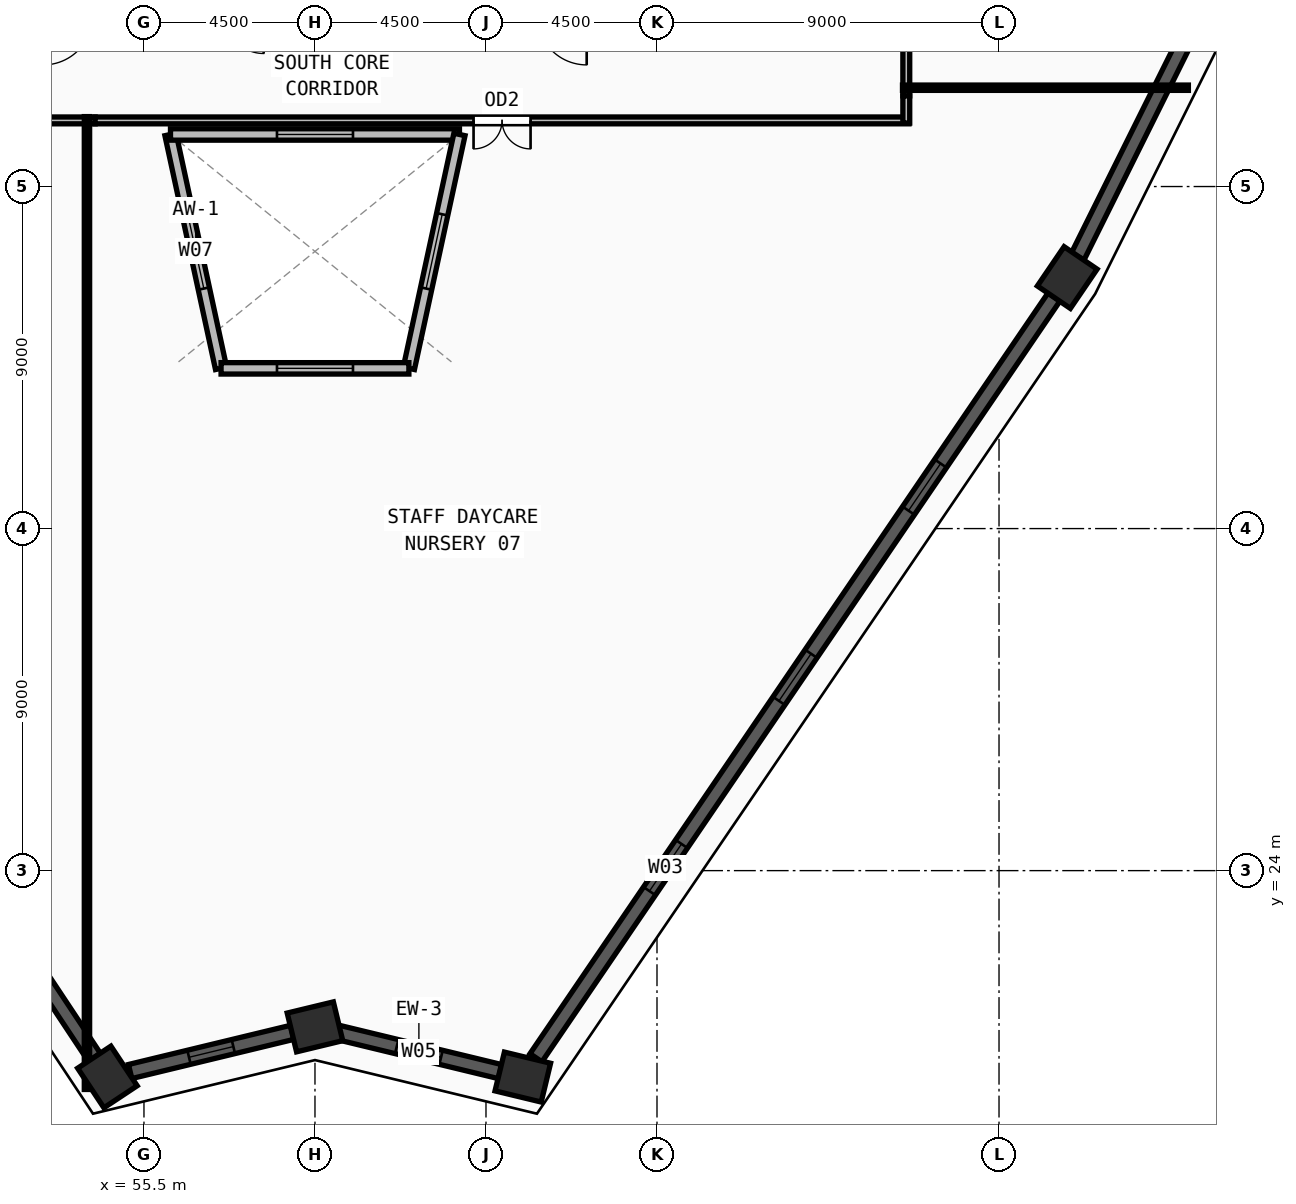
"""IFC4 building model, lengths in metres.
Left out: names, types, materials, properties, quantities, classifications, styles, units other than length and angle.
Written with IfcOpenShell. Run it as: python <this file> out.ifc"""

import sys

from ifc_helpers import new_model, si_unit, direction, frame, frame_2d, origin, origin_2d, place, context, subcontext, project, spatial, rectangle, extrude, source, transform, mapped, element, fill, save


model = new_model("IFC4")
c1 = context("Model", 3, precision=1e-05, world=origin(), true_north=direction((0.0, 1.0)))
c2 = subcontext(c1, "Body", "Model", "MODEL_VIEW")
j1 = project(units=[si_unit("LENGTHUNIT", "METRE"), si_unit("PLANEANGLEUNIT", "RADIAN")], contexts=[c1])
p1 = place(None, origin())
s1 = spatial("IfcSite", under=j1, at=p1, CompositionType="ELEMENT")
p2 = place(p1, origin())
s2 = spatial("IfcBuilding", under=s1, at=p2, CompositionType="ELEMENT")
p3 = place(p2, frame((0.0, 0.0, 213.0)))
s3 = spatial("IfcBuildingStorey", under=s2, at=p3, CompositionType="ELEMENT", Elevation=213.0)
m1 = source(origin(), c2, "Body", "SweptSolid", [
    extrude(rectangle(XDim=1.25, YDim=1.05, at=origin_2d()), origin(), (0.0, 0.0, 1.0), 3.75),
])
for number, where, z_axis, x_axis in (
    (1, (54.538, 18.57, 0.0), (0.0, 0.0, 1.0), (-0.553, 0.833, 0.0)),
    (2, (79.795, 39.605, 0.0), (0.0, 0.0, 1.0), (0.563, 0.827, 0.0)),
    (3, (65.469, 18.568, 0.0), (0.0, 0.0, 1.0), (-0.972, 0.235, 0.0)),
    (4, (60.0, 19.889, 0.0), (0.0, 0.0, 1.0), (0.972, 0.235, 0.0)),
):
    element("IfcColumn", number, at=place(p3, frame(where, z_axis=z_axis, x_axis=x_axis)), inside=s3, PredefinedType="COLUMN", context=c2, shape_type="MappedRepresentation", body=[
        mapped(m1, transform((0.0, 0.0, 0.0), x_axis=(1.0, 0.0, 0.0), y_axis=(0.0, 1.0, 0.0), z_axis=(0.0, 0.0, 1.0), scale=1.0)),
    ])
p4 = place(p3, frame((60.598, 19.745, 0.0), z_axis=(0.0, 0.0, 1.0), x_axis=(0.971991723914, -0.235015081735, 0.0)))
e5 = element("IfcWall", 5, at=p4, inside=s3, PredefinedType="SOLIDWALL", context=c2, shape_type="SweptSolid", body=[
    extrude(rectangle(XDim=4.396, YDim=0.38, at=frame_2d((2.198, 0.0))), origin(), (0.0, 0.0, 1.0), 3.57),
])
m2 = source(origin(), c2, "Body", "SweptSolid", [
    extrude(rectangle(XDim=1.2, YDim=1.9, at=frame_2d((0.6, 0.95))), frame((0.0, 0.2, 0.0), z_axis=(0.0, -1.0, 0.0), x_axis=(1.0, 0.0, 0.0)), (0.0, 0.0, 1.0), 0.4),
])
p5 = place(p4, frame((1.598, 0.0, 0.55)))
e6 = element("IfcOpeningElement", 6, at=p5, cuts=e5, PredefinedType="OPENING", context=c2, shape_type="MappedRepresentation", body=[
    mapped(m2, transform((0.0, 0.0, 0.0), x_axis=(1.0, 0.0, 0.0), y_axis=(0.0, 1.0, 0.0), z_axis=(0.0, 0.0, 1.0), scale=1.0)),
])
p6 = place(p3, frame((65.815, 19.076, 0.0), z_axis=(0.0, 0.0, 1.0), x_axis=(0.562867607659, 0.82654706838, 0.0)))
e7 = element("IfcWall", 7, at=p6, inside=s3, PredefinedType="SOLIDWALL", context=c2, shape_type="SweptSolid", body=[
    extrude(rectangle(XDim=24.222, YDim=0.38, at=frame_2d((12.111, 0.0))), origin(), (0.0, 0.0, 1.0), 3.57),
])
m3 = source(origin(), c2, "Body", "SweptSolid", [
    extrude(rectangle(XDim=1.5, YDim=1.9, at=frame_2d((0.75, 0.95))), frame((0.0, 0.2, 0.0), z_axis=(0.0, -1.0, 0.0), x_axis=(1.0, 0.0, 0.0)), (0.0, 0.0, 1.0), 0.4),
])
p7 = place(p6, frame((5.306, 0.0, 0.55)))
e8 = element("IfcOpeningElement", 8, at=p7, cuts=e7, PredefinedType="OPENING", context=c2, shape_type="MappedRepresentation", body=[
    mapped(m3, transform((0.0, 0.0, 0.0), x_axis=(1.0, 0.0, 0.0), y_axis=(0.0, 1.0, 0.0), z_axis=(0.0, 0.0, 1.0), scale=1.0)),
])
p8 = place(p6, frame((11.361, 0.0, 0.55)))
e9 = element("IfcOpeningElement", 9, at=p8, cuts=e7, PredefinedType="OPENING", context=c2, shape_type="MappedRepresentation", body=[
    mapped(m3, transform((0.0, 0.0, 0.0), x_axis=(1.0, 0.0, 0.0), y_axis=(0.0, 1.0, 0.0), z_axis=(0.0, 0.0, 1.0), scale=1.0)),
])
p9 = place(p6, frame((17.417, 0.0, 0.55)))
e10 = element("IfcOpeningElement", 10, at=p9, cuts=e7, PredefinedType="OPENING", context=c2, shape_type="MappedRepresentation", body=[
    mapped(m3, transform((0.0, 0.0, 0.0), x_axis=(1.0, 0.0, 0.0), y_axis=(0.0, 1.0, 0.0), z_axis=(0.0, 0.0, 1.0), scale=1.0)),
])
p10 = place(p3, frame((80.069, 40.156, 0.0), z_axis=(0.0, 0.0, 1.0), x_axis=(0.445352625388, 0.895355258576, 0.0)))
e11 = element("IfcWall", 11, at=p10, inside=s3, PredefinedType="SOLIDWALL", context=c2, shape_type="SweptSolid", body=[
    extrude(rectangle(XDim=29.349, YDim=0.38, at=frame_2d((14.675, 0.0))), origin(), (0.0, 0.0, 1.0), 3.57),
])
p11 = place(p10, frame((6.587, 0.0, 0.55)))
e12 = element("IfcOpeningElement", 12, at=p11, cuts=e11, PredefinedType="OPENING", context=c2, shape_type="MappedRepresentation", body=[
    mapped(m3, transform((0.0, 0.0, 0.0), x_axis=(1.0, 0.0, 0.0), y_axis=(0.0, 1.0, 0.0), z_axis=(0.0, 0.0, 1.0), scale=1.0)),
])
p12 = place(p10, frame((14.775, 0.0, 0.55)))
e13 = element("IfcOpeningElement", 13, at=p12, cuts=e11, PredefinedType="OPENING", context=c2, shape_type="MappedRepresentation", body=[
    mapped(m3, transform((0.0, 0.0, 0.0), x_axis=(1.0, 0.0, 0.0), y_axis=(0.0, 1.0, 0.0), z_axis=(0.0, 0.0, 1.0), scale=1.0)),
])
p13 = place(p10, frame((21.262, 0.0, 0.55)))
e14 = element("IfcOpeningElement", 14, at=p13, cuts=e11, PredefinedType="OPENING", context=c2, shape_type="MappedRepresentation", body=[
    mapped(m3, transform((0.0, 0.0, 0.0), x_axis=(1.0, 0.0, 0.0), y_axis=(0.0, 1.0, 0.0), z_axis=(0.0, 0.0, 1.0), scale=1.0)),
])
p14 = place(p3, frame((37.976, 43.541, 0.0), z_axis=(0.0, 0.0, 1.0), x_axis=(0.552730970618, -0.833359750719, 0.0)))
e15 = element("IfcWall", 15, at=p14, inside=s3, PredefinedType="SOLIDWALL", context=c2, shape_type="SweptSolid", body=[
    extrude(rectangle(XDim=29.349, YDim=0.38, at=frame_2d((14.674, 0.0))), origin(), (0.0, 0.0, 1.0), 3.57),
])
p15 = place(p14, frame((6.587, 0.0, 0.55)))
e16 = element("IfcOpeningElement", 16, at=p15, cuts=e15, PredefinedType="OPENING", context=c2, shape_type="MappedRepresentation", body=[
    mapped(m3, transform((0.0, 0.0, 0.0), x_axis=(1.0, 0.0, 0.0), y_axis=(0.0, 1.0, 0.0), z_axis=(0.0, 0.0, 1.0), scale=1.0)),
])
p16 = place(p14, frame((13.924, 0.0, 0.55)))
e17 = element("IfcOpeningElement", 17, at=p16, cuts=e15, PredefinedType="OPENING", context=c2, shape_type="MappedRepresentation", body=[
    mapped(m3, transform((0.0, 0.0, 0.0), x_axis=(1.0, 0.0, 0.0), y_axis=(0.0, 1.0, 0.0), z_axis=(0.0, 0.0, 1.0), scale=1.0)),
])
p17 = place(p14, frame((21.262, 0.0, 0.55)))
e18 = element("IfcOpeningElement", 18, at=p17, cuts=e15, PredefinedType="OPENING", context=c2, shape_type="MappedRepresentation", body=[
    mapped(m3, transform((0.0, 0.0, 0.0), x_axis=(1.0, 0.0, 0.0), y_axis=(0.0, 1.0, 0.0), z_axis=(0.0, 0.0, 1.0), scale=1.0)),
])
p18 = place(p3, frame((55.136, 18.714, 0.0), z_axis=(0.0, 0.0, 1.0), x_axis=(0.972016981831, 0.234910593698, 0.0)))
e19 = element("IfcWall", 19, at=p18, inside=s3, PredefinedType="SOLIDWALL", context=c2, shape_type="SweptSolid", body=[
    extrude(rectangle(XDim=4.389, YDim=0.38, at=frame_2d((2.194, 0.0))), origin(), (0.0, 0.0, 1.0), 3.57),
])
p19 = place(p18, frame((1.594, 0.0, 0.55)))
e20 = element("IfcOpeningElement", 20, at=p19, cuts=e19, PredefinedType="OPENING", context=c2, shape_type="MappedRepresentation", body=[
    mapped(m2, transform((0.0, 0.0, 0.0), x_axis=(1.0, 0.0, 0.0), y_axis=(0.0, 1.0, 0.0), z_axis=(0.0, 0.0, 1.0), scale=1.0)),
])
p20 = place(p3, frame((57.529, 37.216, 0.0), z_axis=(0.0, 0.0, 1.0), x_axis=(-0.21140087136, 0.97739944321, 0.0)))
e21 = element("IfcWall", 21, at=p20, inside=s3, PredefinedType="SOLIDWALL", context=c2, shape_type="SweptSolid", body=[
    extrude(rectangle(XDim=6.296, YDim=0.3, at=frame_2d((3.148, 0.0))), origin(), (0.0, 0.0, 1.0), 3.57),
])
m4 = source(origin(), c2, "Body", "SweptSolid", [
    extrude(rectangle(XDim=2.0, YDim=1.9, at=frame_2d((1.0, 0.95))), frame((0.0, 0.16, 0.0), z_axis=(0.0, -1.0, 0.0), x_axis=(1.0, 0.0, 0.0)), (0.0, 0.0, 1.0), 0.32),
])
p21 = place(p20, frame((2.148, 0.0, 0.55)))
e22 = element("IfcOpeningElement", 22, at=p21, cuts=e21, PredefinedType="OPENING", context=c2, shape_type="MappedRepresentation", body=[
    mapped(m4, transform((0.0, 0.0, 0.0), x_axis=(1.0, 0.0, 0.0), y_axis=(0.0, 1.0, 0.0), z_axis=(0.0, 0.0, 1.0), scale=1.0)),
])
p22 = place(p3, frame((56.198, 43.37, 0.0), z_axis=(0.0, 0.0, 1.0), x_axis=(1.0, 0.0, 0.0)))
e23 = element("IfcWall", 23, at=p22, inside=s3, PredefinedType="SOLIDWALL", context=c2, shape_type="SweptSolid", body=[
    extrude(rectangle(XDim=7.604, YDim=0.3, at=frame_2d((3.802, 0.0))), origin(), (0.0, 0.0, 1.0), 3.57),
])
p23 = place(p22, frame((2.802, 0.0, 0.55)))
e24 = element("IfcOpeningElement", 24, at=p23, cuts=e23, PredefinedType="OPENING", context=c2, shape_type="MappedRepresentation", body=[
    mapped(m4, transform((0.0, 0.0, 0.0), x_axis=(1.0, 0.0, 0.0), y_axis=(0.0, 1.0, 0.0), z_axis=(0.0, 0.0, 1.0), scale=1.0)),
])
p24 = place(p3, frame((63.802, 43.37, 0.0), z_axis=(0.0, 0.0, 1.0), x_axis=(-0.21140087136, -0.97739944321, 0.0)))
e25 = element("IfcWall", 25, at=p24, inside=s3, PredefinedType="SOLIDWALL", context=c2, shape_type="SweptSolid", body=[
    extrude(rectangle(XDim=6.296, YDim=0.3, at=frame_2d((3.148, 0.0))), origin(), (0.0, 0.0, 1.0), 3.57),
])
p25 = place(p24, frame((2.148, 0.0, 0.55)))
e26 = element("IfcOpeningElement", 26, at=p25, cuts=e25, PredefinedType="OPENING", context=c2, shape_type="MappedRepresentation", body=[
    mapped(m4, transform((0.0, 0.0, 0.0), x_axis=(1.0, 0.0, 0.0), y_axis=(0.0, 1.0, 0.0), z_axis=(0.0, 0.0, 1.0), scale=1.0)),
])
p26 = place(p3, frame((62.471, 37.216, 0.0), z_axis=(0.0, 0.0, 1.0), x_axis=(-1.0, 0.0, 0.0)))
e27 = element("IfcWall", 27, at=p26, inside=s3, PredefinedType="SOLIDWALL", context=c2, shape_type="SweptSolid", body=[
    extrude(rectangle(XDim=4.942, YDim=0.3, at=frame_2d((2.471, 0.0))), origin(), (0.0, 0.0, 1.0), 3.57),
])
p27 = place(p26, frame((1.471, 0.0, 0.55)))
e28 = element("IfcOpeningElement", 28, at=p27, cuts=e27, PredefinedType="OPENING", context=c2, shape_type="MappedRepresentation", body=[
    mapped(m4, transform((0.0, 0.0, 0.0), x_axis=(1.0, 0.0, 0.0), y_axis=(0.0, 1.0, 0.0), z_axis=(0.0, 0.0, 1.0), scale=1.0)),
])
p28 = place(p3, frame((54.215, 43.74, 0.0), z_axis=(0.0, 0.0, 1.0), x_axis=(-1.0, 0.0, 0.0)))
e29 = element("IfcWall", 29, at=p28, inside=s3, PredefinedType="PARTITIONING", context=c2, shape_type="SweptSolid", body=[
    extrude(rectangle(XDim=9.845, YDim=0.18, at=frame_2d((4.922, 0.0))), origin(), (0.0, 0.0, 1.0), 3.57),
])
m5 = source(origin(), c2, "Body", "SweptSolid", [
    extrude(rectangle(XDim=1.5, YDim=2.2, at=frame_2d((0.75, 1.1))), frame((0.0, 0.1, 0.0), z_axis=(0.0, -1.0, 0.0), x_axis=(1.0, 0.0, 0.0)), (0.0, 0.0, 1.0), 0.2),
])
p29 = place(p28, frame((4.173, 0.0, 0.0)))
e30 = element("IfcOpeningElement", 30, at=p29, cuts=e29, PredefinedType="OPENING", context=c2, shape_type="MappedRepresentation", body=[
    mapped(m5, transform((0.0, 0.0, 0.0), x_axis=(1.0, 0.0, 0.0), y_axis=(0.0, 1.0, 0.0), z_axis=(0.0, 0.0, 1.0), scale=1.0)),
])
p30 = place(p3, frame((75.63, 43.74, 0.0), z_axis=(0.0, 0.0, 1.0), x_axis=(-1.0, 0.0, 0.0)))
e31 = element("IfcWall", 31, at=p30, inside=s3, PredefinedType="PARTITIONING", context=c2, shape_type="SweptSolid", body=[
    extrude(rectangle(XDim=21.415, YDim=0.18, at=frame_2d((10.708, 0.0))), origin(), (0.0, 0.0, 1.0), 3.57),
])
p31 = place(p30, frame((9.957, 0.0, 0.0)))
e32 = element("IfcOpeningElement", 32, at=p31, cuts=e31, PredefinedType="OPENING", context=c2, shape_type="MappedRepresentation", body=[
    mapped(m5, transform((0.0, 0.0, 0.0), x_axis=(1.0, 0.0, 0.0), y_axis=(0.0, 1.0, 0.0), z_axis=(0.0, 0.0, 1.0), scale=1.0)),
])
p32 = place(p3, frame((75.56, 52.285, 0.0), z_axis=(0.0, 0.0, 1.0), x_axis=(0.0, -1.0, 0.0)))
e33 = element("IfcWall", 33, at=p32, inside=s3, PredefinedType="PARTITIONING", context=c2, shape_type="SweptSolid", body=[
    extrude(rectangle(XDim=7.9, YDim=0.18, at=frame_2d((3.95, 0.0))), origin(), (0.0, 0.0, 1.0), 3.57),
])
m6 = source(origin(), c2, "Body", "SweptSolid", [
    extrude(rectangle(XDim=1.0, YDim=2.2, at=frame_2d((0.5, 1.1))), frame((0.0, 0.1, 0.0), z_axis=(0.0, -1.0, 0.0), x_axis=(1.0, 0.0, 0.0)), (0.0, 0.0, 1.0), 0.2),
])
p33 = place(p32, frame((3.45, 0.0, 0.0)))
e34 = element("IfcOpeningElement", 34, at=p33, cuts=e33, PredefinedType="OPENING", context=c2, shape_type="MappedRepresentation", body=[
    mapped(m6, transform((0.0, 0.0, 0.0), x_axis=(1.0, 0.0, 0.0), y_axis=(0.0, 1.0, 0.0), z_axis=(0.0, 0.0, 1.0), scale=1.0)),
])
p34 = place(p3, frame((75.56, 44.385, 0.0), z_axis=(0.0, 0.0, 1.0), x_axis=(0.0, -1.0, 0.0)))
e35 = element("IfcWall", 35, at=p34, inside=s3, PredefinedType="PARTITIONING", context=c2, shape_type="SweptSolid", body=[
    extrude(rectangle(XDim=0.715, YDim=0.18, at=frame_2d((0.357, 0.0))), origin(), (0.0, 0.0, 1.0), 3.57),
])
p35 = place(p3, frame((75.46, 44.6, 0.0), z_axis=(0.0, 0.0, 1.0), x_axis=(1.0, 0.0, 0.0)))
e36 = element("IfcWall", 36, at=p35, inside=s3, PredefinedType="PARTITIONING", context=c2, shape_type="SweptSolid", body=[
    extrude(rectangle(XDim=7.523, YDim=0.14, at=frame_2d((3.761, 0.0))), origin(), (0.0, 0.0, 1.0), 3.57),
])
p36 = place(p3, frame((54.0, 43.84, 0.0), z_axis=(0.0, 0.0, 1.0), x_axis=(0.0, -1.0, 0.0)))
e37 = element("IfcWall", 37, at=p36, inside=s3, PredefinedType="PARTITIONING", context=c2, shape_type="SweptSolid", body=[
    extrude(rectangle(XDim=25.598, YDim=0.14, at=frame_2d((12.799, 0.0))), origin(), (0.0, 0.0, 1.0), 2.855),
])
m7 = source(origin(), c2, "Body", "SweptSolid", [
    extrude(rectangle(XDim=1.2, YDim=1.9, at=frame_2d((0.6, 0.95))), frame((0.0, 0.03, 0.0), z_axis=(0.0, -1.0, 0.0), x_axis=(1.0, 0.0, 0.0)), (0.0, 0.0, 1.0), 0.06),
])
p37 = place(p5, origin())
e38 = element("IfcWindow", 38, at=p37, inside=s3, PartitioningType="SINGLE_PANEL", PredefinedType="WINDOW", context=c2, shape_type="MappedRepresentation", body=[
    mapped(m7, transform((0.0, 0.0, 0.0), x_axis=(1.0, 0.0, 0.0), y_axis=(0.0, 1.0, 0.0), z_axis=(0.0, 0.0, 1.0), scale=1.0)),
])
fill(e6, e38)
m8 = source(origin(), c2, "Body", "SweptSolid", [
    extrude(rectangle(XDim=1.5, YDim=1.9, at=frame_2d((0.75, 0.95))), frame((0.0, 0.03, 0.0), z_axis=(0.0, -1.0, 0.0), x_axis=(1.0, 0.0, 0.0)), (0.0, 0.0, 1.0), 0.06),
])
p38 = place(p7, origin())
e39 = element("IfcWindow", 39, at=p38, inside=s3, PartitioningType="DOUBLE_PANEL_VERTICAL", PredefinedType="WINDOW", context=c2, shape_type="MappedRepresentation", body=[
    mapped(m8, transform((0.0, 0.0, 0.0), x_axis=(1.0, 0.0, 0.0), y_axis=(0.0, 1.0, 0.0), z_axis=(0.0, 0.0, 1.0), scale=1.0)),
])
fill(e8, e39)
p39 = place(p8, origin())
e40 = element("IfcWindow", 40, at=p39, inside=s3, PartitioningType="DOUBLE_PANEL_VERTICAL", PredefinedType="WINDOW", context=c2, shape_type="MappedRepresentation", body=[
    mapped(m8, transform((0.0, 0.0, 0.0), x_axis=(1.0, 0.0, 0.0), y_axis=(0.0, 1.0, 0.0), z_axis=(0.0, 0.0, 1.0), scale=1.0)),
])
fill(e9, e40)
p40 = place(p9, origin())
e41 = element("IfcWindow", 41, at=p40, inside=s3, PartitioningType="DOUBLE_PANEL_VERTICAL", PredefinedType="WINDOW", context=c2, shape_type="MappedRepresentation", body=[
    mapped(m8, transform((0.0, 0.0, 0.0), x_axis=(1.0, 0.0, 0.0), y_axis=(0.0, 1.0, 0.0), z_axis=(0.0, 0.0, 1.0), scale=1.0)),
])
fill(e10, e41)
p41 = place(p19, origin())
e42 = element("IfcWindow", 42, at=p41, inside=s3, PartitioningType="SINGLE_PANEL", PredefinedType="WINDOW", context=c2, shape_type="MappedRepresentation", body=[
    mapped(m7, transform((0.0, 0.0, 0.0), x_axis=(1.0, 0.0, 0.0), y_axis=(0.0, 1.0, 0.0), z_axis=(0.0, 0.0, 1.0), scale=1.0)),
])
fill(e20, e42)
m9 = source(origin(), c2, "Body", "SweptSolid", [
    extrude(rectangle(XDim=2.0, YDim=1.9, at=frame_2d((1.0, 0.95))), frame((0.0, 0.03, 0.0), z_axis=(0.0, -1.0, 0.0), x_axis=(1.0, 0.0, 0.0)), (0.0, 0.0, 1.0), 0.06),
])
p42 = place(p21, origin())
e43 = element("IfcWindow", 43, at=p42, inside=s3, PartitioningType="DOUBLE_PANEL_VERTICAL", PredefinedType="WINDOW", context=c2, shape_type="MappedRepresentation", body=[
    mapped(m9, transform((0.0, 0.0, 0.0), x_axis=(1.0, 0.0, 0.0), y_axis=(0.0, 1.0, 0.0), z_axis=(0.0, 0.0, 1.0), scale=1.0)),
])
fill(e22, e43)
p43 = place(p23, origin())
e44 = element("IfcWindow", 44, at=p43, inside=s3, PartitioningType="DOUBLE_PANEL_VERTICAL", PredefinedType="WINDOW", context=c2, shape_type="MappedRepresentation", body=[
    mapped(m9, transform((0.0, 0.0, 0.0), x_axis=(1.0, 0.0, 0.0), y_axis=(0.0, 1.0, 0.0), z_axis=(0.0, 0.0, 1.0), scale=1.0)),
])
fill(e24, e44)
p44 = place(p25, origin())
e45 = element("IfcWindow", 45, at=p44, inside=s3, PartitioningType="DOUBLE_PANEL_VERTICAL", PredefinedType="WINDOW", context=c2, shape_type="MappedRepresentation", body=[
    mapped(m9, transform((0.0, 0.0, 0.0), x_axis=(1.0, 0.0, 0.0), y_axis=(0.0, 1.0, 0.0), z_axis=(0.0, 0.0, 1.0), scale=1.0)),
])
fill(e26, e45)
p45 = place(p27, origin())
e46 = element("IfcWindow", 46, at=p45, inside=s3, PartitioningType="DOUBLE_PANEL_VERTICAL", PredefinedType="WINDOW", context=c2, shape_type="MappedRepresentation", body=[
    mapped(m9, transform((0.0, 0.0, 0.0), x_axis=(1.0, 0.0, 0.0), y_axis=(0.0, 1.0, 0.0), z_axis=(0.0, 0.0, 1.0), scale=1.0)),
])
fill(e28, e46)
m10 = source(origin(), c2, "Body", "SweptSolid", [
    extrude(rectangle(XDim=1.5, YDim=2.2, at=frame_2d((0.75, 1.1))), frame((0.0, 0.025, 0.0), z_axis=(0.0, -1.0, 0.0), x_axis=(1.0, 0.0, 0.0)), (0.0, 0.0, 1.0), 0.05),
])
p46 = place(p31, origin())
e47 = element("IfcDoor", 47, at=p46, inside=s3, OperationType="DOUBLE_DOOR_SINGLE_SWING", PredefinedType="DOOR", context=c2, shape_type="MappedRepresentation", body=[
    mapped(m10, transform((0.0, 0.0, 0.0), x_axis=(1.0, 0.0, 0.0), y_axis=(0.0, 1.0, 0.0), z_axis=(0.0, 0.0, 1.0), scale=1.0)),
])
fill(e32, e47)
save(model, sys.argv[1])
